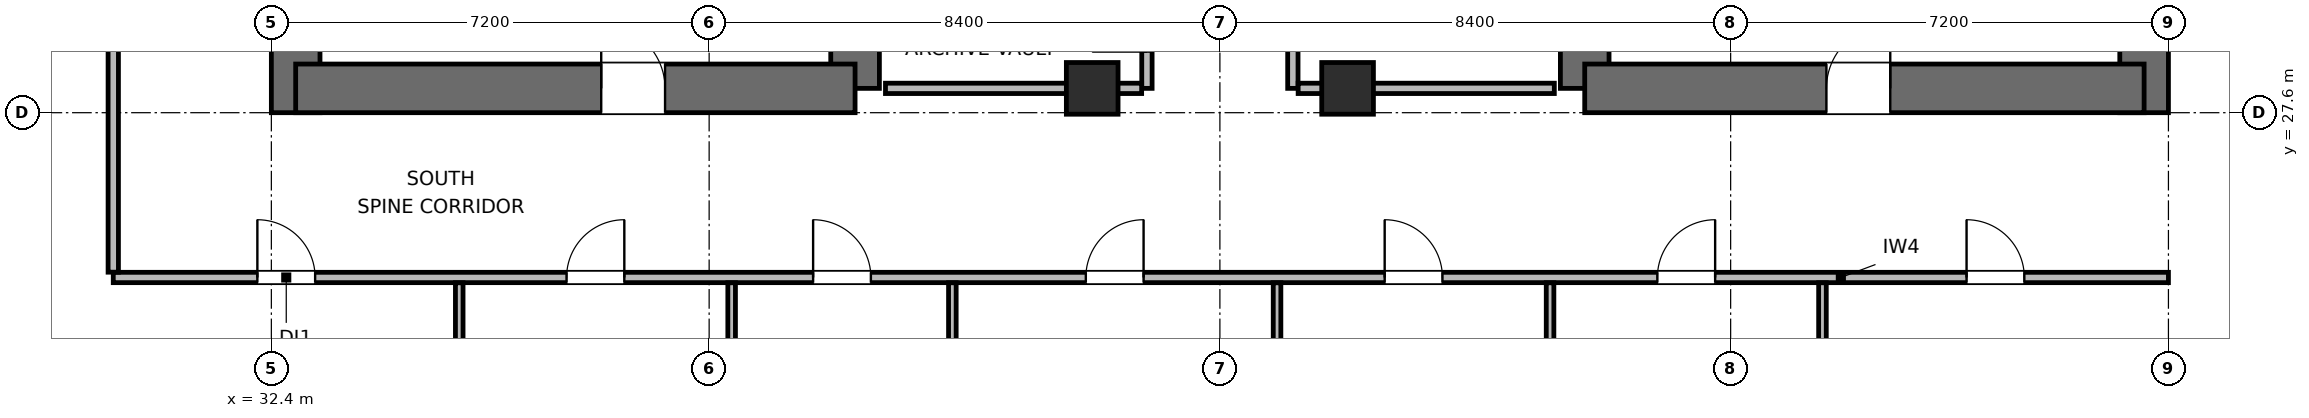
"""IFC4 building model, lengths in metres.
Left out: names, types, materials, properties, quantities, classifications, styles, units other than length and angle.
Written with IfcOpenShell. Run it as: python <this file> out.ifc"""

import sys

from ifc_helpers import new_model, si_unit, direction, frame, frame_2d, origin, origin_2d, place, context, subcontext, project, spatial, rectangle, extrude, element, fill, save


model = new_model("IFC4")
c1 = context("Model", 3, precision=1e-05, world=origin(), true_north=direction((0.0, 1.0)))
c2 = subcontext(c1, "Body", "Model", "MODEL_VIEW")
j1 = project(units=[si_unit("LENGTHUNIT", "METRE"), si_unit("PLANEANGLEUNIT", "RADIAN")], contexts=[c1])
p1 = place(None, origin())
s1 = spatial("IfcSite", under=j1, at=p1, CompositionType="ELEMENT")
p2 = place(p1, origin())
s2 = spatial("IfcBuilding", under=s1, at=p2, CompositionType="ELEMENT")
p3 = place(p2, frame((0.0, 0.0, 166.2)))
s3 = spatial("IfcBuildingStorey", under=s2, at=p3, CompositionType="ELEMENT", Elevation=166.2)
p4 = place(p3, frame((32.8, 27.6, 0.0), z_axis=(0.0, 0.0, 1.0), x_axis=(0.0, 1.0, 0.0)))
e1 = element("IfcWall", 1, at=p4, inside=s3, PredefinedType="SHEAR", context=c2, shape_type="SweptSolid", body=[
    extrude(rectangle(XDim=16.8, YDim=0.8, at=frame_2d((8.4, 0.0))), origin(), (0.0, 0.0, 1.0), 3.9),
])
p5 = place(p3, frame((42.0, 28.0, 0.0), z_axis=(0.0, 0.0, 1.0), x_axis=(0.0, 1.0, 0.0)))
e2 = element("IfcWall", 2, at=p5, inside=s3, PredefinedType="SHEAR", context=c2, shape_type="SweptSolid", body=[
    extrude(rectangle(XDim=6.4, YDim=0.8, at=frame_2d((3.2, 0.0))), origin(), (0.0, 0.0, 1.0), 3.9),
])
p6 = place(p3, frame((32.8, 28.0, 0.0), z_axis=(0.0, 0.0, 1.0), x_axis=(1.0, 0.0, 0.0)))
e3 = element("IfcWall", 3, at=p6, inside=s3, PredefinedType="SHEAR", context=c2, shape_type="SweptSolid", body=[
    extrude(rectangle(XDim=9.2, YDim=0.8, at=frame_2d((4.6, 0.0))), origin(), (0.0, 0.0, 1.0), 3.9),
])
p7 = place(p6, frame((5.025, 0.0, 0.0)))
e4 = element("IfcOpeningElement", 4, at=p7, cuts=e3, PredefinedType="OPENING", context=c2, shape_type="SweptSolid", body=[
    extrude(rectangle(XDim=1.05, YDim=2.04, at=frame_2d((0.525, 1.02))), frame((0.0, 0.41, 0.0), z_axis=(0.0, -1.0, 0.0), x_axis=(1.0, 0.0, 0.0)), (0.0, 0.0, 1.0), 0.82),
])
p8 = place(p3, frame((54.0, 28.0, 0.0), z_axis=(0.0, 0.0, 1.0), x_axis=(0.0, 1.0, 0.0)))
e5 = element("IfcWall", 5, at=p8, inside=s3, PredefinedType="SHEAR", context=c2, shape_type="SweptSolid", body=[
    extrude(rectangle(XDim=7.8, YDim=0.8, at=frame_2d((3.9, 0.0))), origin(), (0.0, 0.0, 1.0), 3.9),
])
p9 = place(p3, frame((63.2, 27.6, 0.0), z_axis=(0.0, 0.0, 1.0), x_axis=(0.0, 1.0, 0.0)))
e6 = element("IfcWall", 6, at=p9, inside=s3, PredefinedType="SHEAR", context=c2, shape_type="SweptSolid", body=[
    extrude(rectangle(XDim=16.8, YDim=0.8, at=frame_2d((8.4, 0.0))), origin(), (0.0, 0.0, 1.0), 3.9),
])
p10 = place(p3, frame((54.0, 28.0, 0.0), z_axis=(0.0, 0.0, 1.0), x_axis=(1.0, 0.0, 0.0)))
e7 = element("IfcWall", 7, at=p10, inside=s3, PredefinedType="SHEAR", context=c2, shape_type="SweptSolid", body=[
    extrude(rectangle(XDim=9.2, YDim=0.8, at=frame_2d((4.6, 0.0))), origin(), (0.0, 0.0, 1.0), 3.9),
])
p11 = place(p10, frame((3.975, 0.0, 0.0)))
e8 = element("IfcOpeningElement", 8, at=p11, cuts=e7, PredefinedType="OPENING", context=c2, shape_type="SweptSolid", body=[
    extrude(rectangle(XDim=1.05, YDim=2.04, at=frame_2d((0.525, 1.02))), frame((0.0, 0.41, 0.0), z_axis=(0.0, -1.0, 0.0), x_axis=(1.0, 0.0, 0.0)), (0.0, 0.0, 1.0), 0.82),
])
for number, where, z_axis, x_axis in (
    (9, (45.9, 28.0, 0.0), (0.0, 0.0, 1.0), (1.0, 0.0, 0.0)),
    (10, (50.1, 28.0, 0.0), (0.0, 0.0, 1.0), (1.0, 0.0, 0.0)),
):
    element("IfcColumn", number, at=place(p3, frame(where, z_axis=z_axis, x_axis=x_axis)), inside=s3, PredefinedType="COLUMN", context=c2, shape_type="SweptSolid", body=[
        extrude(rectangle(XDim=0.85, YDim=0.85, at=origin_2d()), origin(), (0.0, 0.0, 1.0), 3.9),
    ])
p12 = place(p3, frame((46.8, 28.0, 0.0), z_axis=(0.0, 0.0, 1.0), x_axis=(0.0, 1.0, 0.0)))
e11 = element("IfcWall", 11, at=p12, inside=s3, PredefinedType="PARTITIONING", context=c2, shape_type="SweptSolid", body=[
    extrude(rectangle(XDim=4.5, YDim=0.17, at=frame_2d((2.25, 0.0))), origin(), (0.0, 0.0, 1.0), 3.68),
])
p13 = place(p12, frame((0.605, 0.0, 0.0)))
e12 = element("IfcOpeningElement", 12, at=p13, cuts=e11, PredefinedType="OPENING", context=c2, shape_type="SweptSolid", body=[
    extrude(rectangle(XDim=0.9, YDim=2.02, at=frame_2d((0.45, 1.01))), frame((0.0, 0.095, 0.0), z_axis=(0.0, -1.0, 0.0), x_axis=(1.0, 0.0, 0.0)), (0.0, 0.0, 1.0), 0.19),
])
p14 = place(p12, frame((2.655, 0.0, 0.0)))
e13 = element("IfcOpeningElement", 13, at=p14, cuts=e11, PredefinedType="OPENING", context=c2, shape_type="SweptSolid", body=[
    extrude(rectangle(XDim=0.9, YDim=2.02, at=frame_2d((0.45, 1.01))), frame((0.0, 0.095, 0.0), z_axis=(0.0, -1.0, 0.0), x_axis=(1.0, 0.0, 0.0)), (0.0, 0.0, 1.0), 0.19),
])
p15 = place(p3, frame((42.5, 28.0, 0.0), z_axis=(0.0, 0.0, 1.0), x_axis=(1.0, 0.0, 0.0)))
e14 = element("IfcWall", 14, at=p15, inside=s3, PredefinedType="PARTITIONING", context=c2, shape_type="SweptSolid", body=[
    extrude(rectangle(XDim=4.213, YDim=0.17, at=frame_2d((2.106, 0.0))), origin(), (0.0, 0.0, 1.0), 2.765),
])
p16 = place(p3, frame((49.2, 28.0, 0.0), z_axis=(0.0, 0.0, 1.0), x_axis=(0.0, 1.0, 0.0)))
e15 = element("IfcWall", 15, at=p16, inside=s3, PredefinedType="PARTITIONING", context=c2, shape_type="SweptSolid", body=[
    extrude(rectangle(XDim=4.5, YDim=0.17, at=frame_2d((2.25, 0.0))), origin(), (0.0, 0.0, 1.0), 3.68),
])
p17 = place(p16, frame((0.99, 0.0, 0.0)))
e16 = element("IfcOpeningElement", 16, at=p17, cuts=e15, PredefinedType="OPENING", context=c2, shape_type="SweptSolid", body=[
    extrude(rectangle(XDim=0.9, YDim=2.02, at=frame_2d((0.45, 1.01))), frame((0.0, 0.095, 0.0), z_axis=(0.0, -1.0, 0.0), x_axis=(1.0, 0.0, 0.0)), (0.0, 0.0, 1.0), 0.19),
])
p18 = place(p16, frame((3.24, 0.0, 0.0)))
e17 = element("IfcOpeningElement", 17, at=p18, cuts=e15, PredefinedType="OPENING", context=c2, shape_type="SweptSolid", body=[
    extrude(rectangle(XDim=0.9, YDim=2.02, at=frame_2d((0.45, 1.01))), frame((0.0, 0.095, 0.0), z_axis=(0.0, -1.0, 0.0), x_axis=(1.0, 0.0, 0.0)), (0.0, 0.0, 1.0), 0.19),
])
p19 = place(p3, frame((49.287, 28.0, 0.0), z_axis=(0.0, 0.0, 1.0), x_axis=(1.0, 0.0, 0.0)))
e18 = element("IfcWall", 18, at=p19, inside=s3, PredefinedType="PARTITIONING", context=c2, shape_type="SweptSolid", body=[
    extrude(rectangle(XDim=4.213, YDim=0.17, at=frame_2d((2.106, 0.0))), origin(), (0.0, 0.0, 1.0), 2.765),
])
p20 = place(p3, frame((29.8, 24.89, 0.0), z_axis=(0.0, 0.0, 1.0), x_axis=(1.0, 0.0, 0.0)))
e19 = element("IfcWall", 19, at=p20, inside=s3, PredefinedType="PARTITIONING", context=c2, shape_type="SweptSolid", body=[
    extrude(rectangle(XDim=33.8, YDim=0.17, at=frame_2d((16.9, 0.0))), origin(), (0.0, 0.0, 1.0), 3.68),
])
p21 = place(p20, frame((2.37, 0.0, 0.0)))
e20 = element("IfcOpeningElement", 20, at=p21, cuts=e19, PredefinedType="OPENING", context=c2, shape_type="SweptSolid", body=[
    extrude(rectangle(XDim=0.95, YDim=2.04, at=frame_2d((0.475, 1.02))), frame((0.0, 0.095, 0.0), z_axis=(0.0, -1.0, 0.0), x_axis=(1.0, 0.0, 0.0)), (0.0, 0.0, 1.0), 0.19),
])
p22 = place(p20, frame((7.455, 0.0, 0.0)))
e21 = element("IfcOpeningElement", 21, at=p22, cuts=e19, PredefinedType="OPENING", context=c2, shape_type="SweptSolid", body=[
    extrude(rectangle(XDim=0.95, YDim=2.04, at=frame_2d((0.475, 1.02))), frame((0.0, 0.095, 0.0), z_axis=(0.0, -1.0, 0.0), x_axis=(1.0, 0.0, 0.0)), (0.0, 0.0, 1.0), 0.19),
])
p23 = place(p20, frame((11.51, 0.0, 0.0)))
e22 = element("IfcOpeningElement", 22, at=p23, cuts=e19, PredefinedType="OPENING", context=c2, shape_type="SweptSolid", body=[
    extrude(rectangle(XDim=0.95, YDim=2.04, at=frame_2d((0.475, 1.02))), frame((0.0, 0.095, 0.0), z_axis=(0.0, -1.0, 0.0), x_axis=(1.0, 0.0, 0.0)), (0.0, 0.0, 1.0), 0.19),
])
p24 = place(p20, frame((15.995, 0.0, 0.0)))
e23 = element("IfcOpeningElement", 23, at=p24, cuts=e19, PredefinedType="OPENING", context=c2, shape_type="SweptSolid", body=[
    extrude(rectangle(XDim=0.95, YDim=2.04, at=frame_2d((0.475, 1.02))), frame((0.0, 0.095, 0.0), z_axis=(0.0, -1.0, 0.0), x_axis=(1.0, 0.0, 0.0)), (0.0, 0.0, 1.0), 0.19),
])
p25 = place(p20, frame((20.91, 0.0, 0.0)))
e24 = element("IfcOpeningElement", 24, at=p25, cuts=e19, PredefinedType="OPENING", context=c2, shape_type="SweptSolid", body=[
    extrude(rectangle(XDim=0.95, YDim=2.04, at=frame_2d((0.475, 1.02))), frame((0.0, 0.095, 0.0), z_axis=(0.0, -1.0, 0.0), x_axis=(1.0, 0.0, 0.0)), (0.0, 0.0, 1.0), 0.19),
])
p26 = place(p20, frame((25.395, 0.0, 0.0)))
e25 = element("IfcOpeningElement", 25, at=p26, cuts=e19, PredefinedType="OPENING", context=c2, shape_type="SweptSolid", body=[
    extrude(rectangle(XDim=0.95, YDim=2.04, at=frame_2d((0.475, 1.02))), frame((0.0, 0.095, 0.0), z_axis=(0.0, -1.0, 0.0), x_axis=(1.0, 0.0, 0.0)), (0.0, 0.0, 1.0), 0.19),
])
p27 = place(p20, frame((30.48, 0.0, 0.0)))
e26 = element("IfcOpeningElement", 26, at=p27, cuts=e19, PredefinedType="OPENING", context=c2, shape_type="SweptSolid", body=[
    extrude(rectangle(XDim=0.95, YDim=2.04, at=frame_2d((0.475, 1.02))), frame((0.0, 0.095, 0.0), z_axis=(0.0, -1.0, 0.0), x_axis=(1.0, 0.0, 0.0)), (0.0, 0.0, 1.0), 0.19),
])
p28 = place(p3, frame((29.8, 24.977, 0.0), z_axis=(0.0, 0.0, 1.0), x_axis=(0.0, 1.0, 0.0)))
e27 = element("IfcWall", 27, at=p28, inside=s3, PredefinedType="PARTITIONING", context=c2, shape_type="SweptSolid", body=[
    extrude(rectangle(XDim=9.423, YDim=0.17, at=frame_2d((4.711, 0.0))), origin(), (0.0, 0.0, 1.0), 3.68),
])
p29 = place(p28, frame((4.193, 0.0, 0.0)))
e28 = element("IfcOpeningElement", 28, at=p29, cuts=e27, PredefinedType="OPENING", context=c2, shape_type="SweptSolid", body=[
    extrude(rectangle(XDim=0.95, YDim=2.04, at=frame_2d((0.475, 1.02))), frame((0.0, 0.095, 0.0), z_axis=(0.0, -1.0, 0.0), x_axis=(1.0, 0.0, 0.0)), (0.0, 0.0, 1.0), 0.19),
])
p30 = place(p3, frame((35.49, 18.875, 0.0), z_axis=(0.0, 0.0, 1.0), x_axis=(0.0, 1.0, 0.0)))
e29 = element("IfcWall", 29, at=p30, inside=s3, PredefinedType="PARTITIONING", context=c2, shape_type="SweptSolid", body=[
    extrude(rectangle(XDim=5.928, YDim=0.125, at=frame_2d((2.964, 0.0))), origin(), (0.0, 0.0, 1.0), 3.68),
])
p31 = place(p3, frame((39.97, 18.875, 0.0), z_axis=(0.0, 0.0, 1.0), x_axis=(0.0, 1.0, 0.0)))
e30 = element("IfcWall", 30, at=p31, inside=s3, PredefinedType="PARTITIONING", context=c2, shape_type="SweptSolid", body=[
    extrude(rectangle(XDim=5.928, YDim=0.125, at=frame_2d((2.964, 0.0))), origin(), (0.0, 0.0, 1.0), 3.043),
])
p32 = place(p3, frame((43.6, 22.555, 0.0), z_axis=(0.0, 0.0, 1.0), x_axis=(0.0, 1.0, 0.0)))
e31 = element("IfcWall", 31, at=p32, inside=s3, PredefinedType="PARTITIONING", context=c2, shape_type="SweptSolid", body=[
    extrude(rectangle(XDim=2.248, YDim=0.125, at=frame_2d((1.124, 0.0))), origin(), (0.0, 0.0, 1.0), 3.043),
])
p33 = place(p3, frame((48.94, 20.475, 0.0), z_axis=(0.0, 0.0, 1.0), x_axis=(0.0, 1.0, 0.0)))
e32 = element("IfcWall", 32, at=p33, inside=s3, PredefinedType="PARTITIONING", context=c2, shape_type="SweptSolid", body=[
    extrude(rectangle(XDim=4.328, YDim=0.125, at=frame_2d((2.164, 0.0))), origin(), (0.0, 0.0, 1.0), 3.68),
])
p34 = place(p3, frame((53.43, 19.653, 0.0), z_axis=(0.0, 0.0, 1.0), x_axis=(0.0, 1.0, 0.0)))
e33 = element("IfcWall", 33, at=p34, inside=s3, PredefinedType="PARTITIONING", context=c2, shape_type="SweptSolid", body=[
    extrude(rectangle(XDim=5.15, YDim=0.125, at=frame_2d((2.575, 0.0))), origin(), (0.0, 0.0, 1.0), 3.043),
])
p35 = place(p3, frame((57.91, 18.875, 0.0), z_axis=(0.0, 0.0, 1.0), x_axis=(0.0, 1.0, 0.0)))
e34 = element("IfcWall", 34, at=p35, inside=s3, PredefinedType="PARTITIONING", context=c2, shape_type="SweptSolid", body=[
    extrude(rectangle(XDim=5.928, YDim=0.125, at=frame_2d((2.964, 0.0))), origin(), (0.0, 0.0, 1.0), 3.68),
])
p36 = place(p7, origin())
e35 = element("IfcDoor", 35, at=p36, inside=s3, OperationType="SINGLE_SWING_LEFT", PredefinedType="DOOR", context=c2, shape_type="SweptSolid", body=[
    extrude(rectangle(XDim=1.05, YDim=2.04, at=frame_2d((0.525, 1.02))), frame((0.0, 0.025, 0.0), z_axis=(0.0, -1.0, 0.0), x_axis=(1.0, 0.0, 0.0)), (0.0, 0.0, 1.0), 0.05),
])
fill(e4, e35)
p37 = place(p11, origin())
e36 = element("IfcDoor", 36, at=p37, inside=s3, OperationType="SINGLE_SWING_RIGHT", PredefinedType="DOOR", context=c2, shape_type="SweptSolid", body=[
    extrude(rectangle(XDim=1.05, YDim=2.04, at=frame_2d((0.525, 1.02))), frame((0.0, 0.025, 0.0), z_axis=(0.0, -1.0, 0.0), x_axis=(1.0, 0.0, 0.0)), (0.0, 0.0, 1.0), 0.05),
])
fill(e8, e36)
p38 = place(p21, origin())
e37 = element("IfcDoor", 37, at=p38, inside=s3, OperationType="SINGLE_SWING_LEFT", PredefinedType="DOOR", context=c2, shape_type="SweptSolid", body=[
    extrude(rectangle(XDim=0.95, YDim=2.04, at=frame_2d((0.475, 1.02))), frame((0.0, 0.025, 0.0), z_axis=(0.0, -1.0, 0.0), x_axis=(1.0, 0.0, 0.0)), (0.0, 0.0, 1.0), 0.05),
])
fill(e20, e37)
p39 = place(p22, origin())
e38 = element("IfcDoor", 38, at=p39, inside=s3, OperationType="SINGLE_SWING_RIGHT", PredefinedType="DOOR", context=c2, shape_type="SweptSolid", body=[
    extrude(rectangle(XDim=0.95, YDim=2.04, at=frame_2d((0.475, 1.02))), frame((0.0, 0.025, 0.0), z_axis=(0.0, -1.0, 0.0), x_axis=(1.0, 0.0, 0.0)), (0.0, 0.0, 1.0), 0.05),
])
fill(e21, e38)
p40 = place(p23, origin())
e39 = element("IfcDoor", 39, at=p40, inside=s3, OperationType="SINGLE_SWING_LEFT", PredefinedType="DOOR", context=c2, shape_type="SweptSolid", body=[
    extrude(rectangle(XDim=0.95, YDim=2.04, at=frame_2d((0.475, 1.02))), frame((0.0, 0.025, 0.0), z_axis=(0.0, -1.0, 0.0), x_axis=(1.0, 0.0, 0.0)), (0.0, 0.0, 1.0), 0.05),
])
fill(e22, e39)
p41 = place(p24, origin())
e40 = element("IfcDoor", 40, at=p41, inside=s3, OperationType="SINGLE_SWING_RIGHT", PredefinedType="DOOR", context=c2, shape_type="SweptSolid", body=[
    extrude(rectangle(XDim=0.95, YDim=2.04, at=frame_2d((0.475, 1.02))), frame((0.0, 0.025, 0.0), z_axis=(0.0, -1.0, 0.0), x_axis=(1.0, 0.0, 0.0)), (0.0, 0.0, 1.0), 0.05),
])
fill(e23, e40)
p42 = place(p25, origin())
e41 = element("IfcDoor", 41, at=p42, inside=s3, OperationType="SINGLE_SWING_LEFT", PredefinedType="DOOR", context=c2, shape_type="SweptSolid", body=[
    extrude(rectangle(XDim=0.95, YDim=2.04, at=frame_2d((0.475, 1.02))), frame((0.0, 0.025, 0.0), z_axis=(0.0, -1.0, 0.0), x_axis=(1.0, 0.0, 0.0)), (0.0, 0.0, 1.0), 0.05),
])
fill(e24, e41)
p43 = place(p26, origin())
e42 = element("IfcDoor", 42, at=p43, inside=s3, OperationType="SINGLE_SWING_RIGHT", PredefinedType="DOOR", context=c2, shape_type="SweptSolid", body=[
    extrude(rectangle(XDim=0.95, YDim=2.04, at=frame_2d((0.475, 1.02))), frame((0.0, 0.025, 0.0), z_axis=(0.0, -1.0, 0.0), x_axis=(1.0, 0.0, 0.0)), (0.0, 0.0, 1.0), 0.05),
])
fill(e25, e42)
p44 = place(p27, origin())
e43 = element("IfcDoor", 43, at=p44, inside=s3, OperationType="SINGLE_SWING_LEFT", PredefinedType="DOOR", context=c2, shape_type="SweptSolid", body=[
    extrude(rectangle(XDim=0.95, YDim=2.04, at=frame_2d((0.475, 1.02))), frame((0.0, 0.025, 0.0), z_axis=(0.0, -1.0, 0.0), x_axis=(1.0, 0.0, 0.0)), (0.0, 0.0, 1.0), 0.05),
])
fill(e26, e43)
save(model, sys.argv[1])
